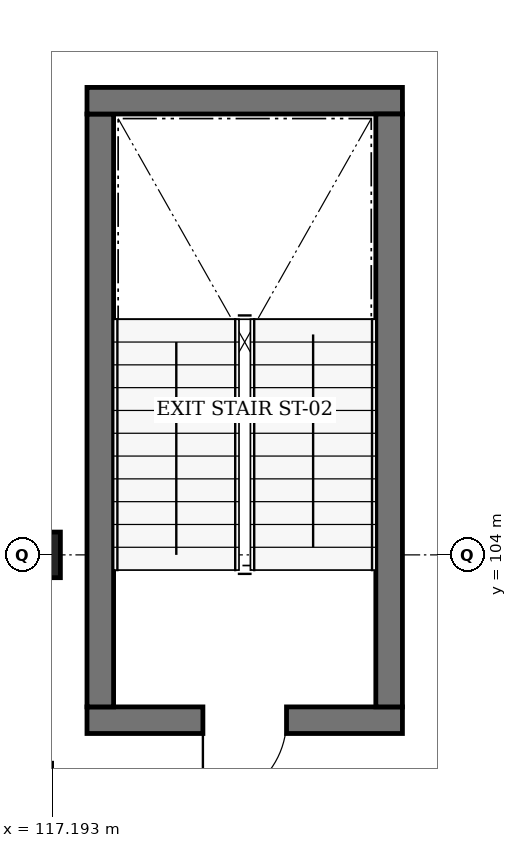
"""IFC4 building model, lengths in metres.
Left out: names, types, materials, properties, quantities, classifications, styles, units other than length and angle.
Written with IfcOpenShell. Run it as: python <this file> out.ifc"""

import sys

from ifc_helpers import new_model, si_unit, direction, frame, frame_2d, origin, origin_2d, place, context, subcontext, project, spatial, rectangle, extrude, element, fill, save


model = new_model("IFC4")
c1 = context("Model", 3, precision=1e-05, world=origin(), true_north=direction((0.0, 1.0)))
c2 = subcontext(c1, "Body", "Model", "MODEL_VIEW")
j1 = project(units=[si_unit("LENGTHUNIT", "METRE"), si_unit("PLANEANGLEUNIT", "RADIAN")], contexts=[c1])
p1 = place(None, origin())
s1 = spatial("IfcSite", under=j1, at=p1, CompositionType="ELEMENT")
p2 = place(p1, origin())
s2 = spatial("IfcBuilding", under=s1, at=p2, CompositionType="ELEMENT")
p3 = place(p2, frame((0.0, 0.0, 4.8)))
s3 = spatial("IfcBuildingStorey", under=s2, at=p3, CompositionType="ELEMENT", Elevation=4.8)
p4 = place(p3, frame((117.0, 104.0, 0.0), z_axis=(0.0, 0.0, 1.0), x_axis=(1.0, 0.0, 0.0)))
e1 = element("IfcColumn", 1, at=p4, inside=s3, PredefinedType="COLUMN", context=c2, shape_type="SweptSolid", body=[
    extrude(rectangle(XDim=0.6, YDim=0.6, at=origin_2d()), origin(), (0.0, 0.0, 1.0), 4.2),
])
p5 = place(p3, frame((121.8, 101.825, 0.0), z_axis=(0.0, 0.0, 1.0), x_axis=(-1.0, 0.0, 0.0)))
e2 = element("IfcWall", 2, at=p5, inside=s3, PredefinedType="SOLIDWALL", context=c2, shape_type="SweptSolid", body=[
    extrude(rectangle(XDim=4.15, YDim=0.35, at=frame_2d((2.075, 0.0))), origin(), (0.0, 0.0, 1.0), 4.2),
])
p6 = place(p5, frame((1.525, 0.0, 0.0)))
e3 = element("IfcOpeningElement", 3, at=p6, cuts=e2, PredefinedType="OPENING", context=c2, shape_type="SweptSolid", body=[
    extrude(rectangle(XDim=1.1, YDim=2.15, at=frame_2d((0.55, 1.075))), frame((0.0, 0.195, 0.0), z_axis=(0.0, -1.0, 0.0), x_axis=(1.0, 0.0, 0.0)), (0.0, 0.0, 1.0), 0.39),
])
p7 = place(p3, frame((117.825, 102.0, 0.0), z_axis=(0.0, 0.0, 1.0), x_axis=(0.0, 1.0, 0.0)))
e4 = element("IfcWall", 4, at=p7, inside=s3, PredefinedType="SOLIDWALL", context=c2, shape_type="SweptSolid", body=[
    extrude(rectangle(XDim=7.8, YDim=0.35, at=frame_2d((3.9, 0.0))), origin(), (0.0, 0.0, 1.0), 4.2),
])
p8 = place(p3, frame((117.65, 109.975, 0.0), z_axis=(0.0, 0.0, 1.0), x_axis=(1.0, 0.0, 0.0)))
e5 = element("IfcWall", 5, at=p8, inside=s3, PredefinedType="SOLIDWALL", context=c2, shape_type="SweptSolid", body=[
    extrude(rectangle(XDim=4.15, YDim=0.35, at=frame_2d((2.075, 0.0))), origin(), (0.0, 0.0, 1.0), 4.2),
])
p9 = place(p3, frame((121.625, 109.8, 0.0), z_axis=(0.0, 0.0, 1.0), x_axis=(0.0, -1.0, 0.0)))
e6 = element("IfcWall", 6, at=p9, inside=s3, PredefinedType="SOLIDWALL", context=c2, shape_type="SweptSolid", body=[
    extrude(rectangle(XDim=7.8, YDim=0.35, at=frame_2d((3.9, 0.0))), origin(), (0.0, 0.0, 1.0), 4.2),
])
p10 = place(p3, frame((117.2, 101.2, 0.0), z_axis=(0.0, 0.0, 1.0), x_axis=(-1.0, 0.0, 0.0)))
e7 = element("IfcWall", 7, at=p10, inside=s3, PredefinedType="PARTITIONING", context=c2, shape_type="SweptSolid", body=[
    extrude(rectangle(XDim=8.8, YDim=0.15, at=frame_2d((4.4, 0.0))), origin(), (0.0, 0.0, 1.0), 3.94),
])
p11 = place(p10, frame((3.309, 0.0, 0.0)))
e8 = element("IfcOpeningElement", 8, at=p11, cuts=e7, PredefinedType="OPENING", context=c2, shape_type="SweptSolid", body=[
    extrude(rectangle(XDim=0.95, YDim=2.2, at=frame_2d((0.475, 1.1))), frame((0.0, 0.095, 0.0), z_axis=(0.0, -1.0, 0.0), x_axis=(1.0, 0.0, 0.0)), (0.0, 0.0, 1.0), 0.19),
])
p12 = place(p6, origin())
e9 = element("IfcDoor", 9, at=p12, inside=s3, OperationType="SINGLE_SWING_RIGHT", PredefinedType="DOOR", context=c2, shape_type="SweptSolid", body=[
    extrude(rectangle(XDim=1.1, YDim=2.15, at=frame_2d((0.55, 1.075))), frame((0.0, 0.025, 0.0), z_axis=(0.0, -1.0, 0.0), x_axis=(1.0, 0.0, 0.0)), (0.0, 0.0, 1.0), 0.05),
])
fill(e3, e9)
save(model, sys.argv[1])
